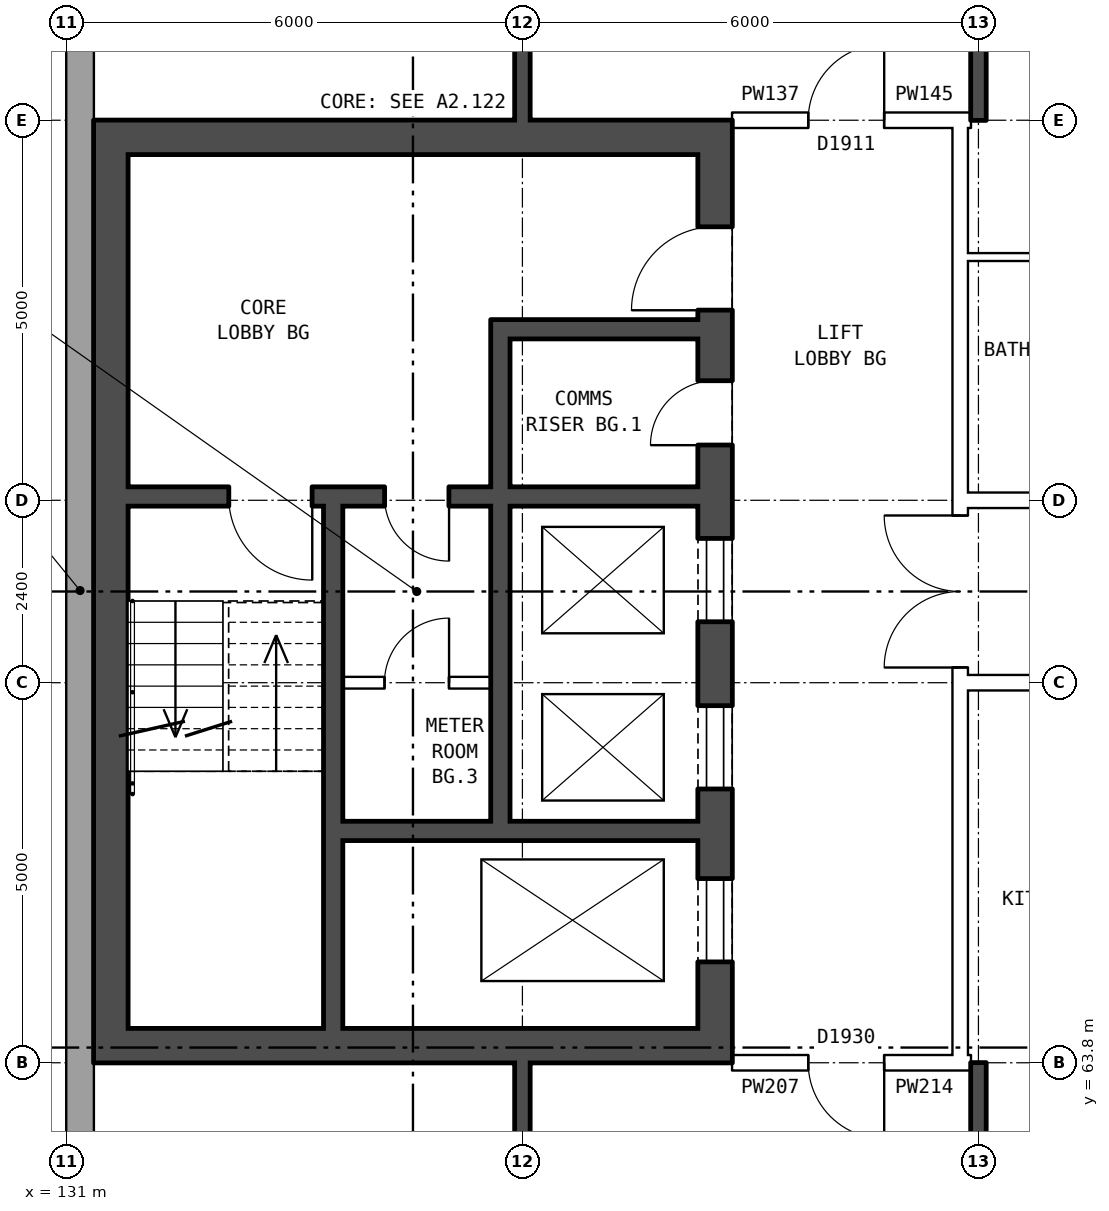
"""IFC4 building model, lengths in metres.
Left out: names, types, materials, properties, quantities, classifications, styles, units other than length and angle.
Written with IfcOpenShell. Run it as: python <this file> out.ifc"""

import sys

from ifc_helpers import new_model, si_unit, direction, frame, frame_2d, origin, place, context, subcontext, project, spatial, rectangle, extrude, element, fill, save


model = new_model("IFC4")
c1 = context("Model", 3, precision=1e-05, world=origin(), true_north=direction((0.0, 1.0)))
c2 = subcontext(c1, "Body", "Model", "MODEL_VIEW")
j1 = project(units=[si_unit("LENGTHUNIT", "METRE"), si_unit("PLANEANGLEUNIT", "RADIAN")], contexts=[c1])
p1 = place(None, origin())
s1 = spatial("IfcSite", under=j1, at=p1, CompositionType="ELEMENT")
p2 = place(p1, origin())
s2 = spatial("IfcBuilding", under=s1, at=p2, CompositionType="ELEMENT")
p3 = place(p2, frame((0.0, 0.0, 185.1)))
s3 = spatial("IfcBuildingStorey", under=s2, at=p3, CompositionType="ELEMENT", Elevation=185.1)
p4 = place(p3, frame((131.18, 82.925, 0.0), z_axis=(0.0, 0.0, 1.0), x_axis=(0.0, -1.0, 0.0)))
e1 = element("IfcWall", 1, at=p4, inside=s3, PredefinedType="STANDARD", context=c2, shape_type="SweptSolid", body=[
    extrude(rectangle(XDim=25.851, YDim=0.36, at=frame_2d((12.925, 0.0))), origin(), (0.0, 0.0, 1.0), 2.85),
])
p5 = place(p4, frame((1.625, 0.0, 0.8)))
e2 = element("IfcOpeningElement", 2, at=p5, cuts=e1, PredefinedType="OPENING", context=c2, shape_type="SweptSolid", body=[
    extrude(rectangle(XDim=1.6, YDim=1.8, at=frame_2d((0.8, 0.9))), frame((0.0, 0.19, 0.0), z_axis=(0.0, -1.0, 0.0), x_axis=(1.0, 0.0, 0.0)), (0.0, 0.0, 1.0), 0.38),
])
p6 = place(p4, frame((3.525, 0.0, 0.8)))
e3 = element("IfcOpeningElement", 3, at=p6, cuts=e1, PredefinedType="OPENING", context=c2, shape_type="SweptSolid", body=[
    extrude(rectangle(XDim=0.8, YDim=1.8, at=frame_2d((0.4, 0.9))), frame((0.0, 0.19, 0.0), z_axis=(0.0, -1.0, 0.0), x_axis=(1.0, 0.0, 0.0)), (0.0, 0.0, 1.0), 0.38),
])
p7 = place(p4, frame((20.2, 0.0, 0.8)))
e4 = element("IfcOpeningElement", 4, at=p7, cuts=e1, PredefinedType="OPENING", context=c2, shape_type="SweptSolid", body=[
    extrude(rectangle(XDim=0.6, YDim=0.9, at=frame_2d((0.3, 0.45))), frame((0.0, 0.19, 0.0), z_axis=(0.0, -1.0, 0.0), x_axis=(1.0, 0.0, 0.0)), (0.0, 0.0, 1.0), 0.38),
])
p8 = place(p4, frame((22.625, 0.0, 0.8)))
e5 = element("IfcOpeningElement", 5, at=p8, cuts=e1, PredefinedType="OPENING", context=c2, shape_type="SweptSolid", body=[
    extrude(rectangle(XDim=1.6, YDim=1.8, at=frame_2d((0.8, 0.9))), frame((0.0, 0.19, 0.0), z_axis=(0.0, -1.0, 0.0), x_axis=(1.0, 0.0, 0.0)), (0.0, 0.0, 1.0), 0.38),
])
p9 = place(p4, frame((4.625, 0.0, 0.8)))
e6 = element("IfcOpeningElement", 6, at=p9, cuts=e1, PredefinedType="OPENING", context=c2, shape_type="SweptSolid", body=[
    extrude(rectangle(XDim=1.0, YDim=0.9, at=frame_2d((0.5, 0.45))), frame((0.0, 0.19, 0.0), z_axis=(0.0, -1.0, 0.0), x_axis=(1.0, 0.0, 0.0)), (0.0, 0.0, 1.0), 0.38),
])
p10 = place(p4, frame((21.1, 0.0, 0.8)))
e7 = element("IfcOpeningElement", 7, at=p10, cuts=e1, PredefinedType="OPENING", context=c2, shape_type="SweptSolid", body=[
    extrude(rectangle(XDim=1.2, YDim=1.5, at=frame_2d((0.6, 0.75))), frame((0.0, 0.19, 0.0), z_axis=(0.0, -1.0, 0.0), x_axis=(1.0, 0.0, 0.0)), (0.0, 0.0, 1.0), 0.38),
])
p11 = place(p3, frame((139.535, 63.8, 0.0), z_axis=(0.0, 0.0, 1.0), x_axis=(0.0, 1.0, 0.0)))
e8 = element("IfcWall", 8, at=p11, inside=s3, PredefinedType="SHEAR", context=c2, shape_type="SweptSolid", body=[
    extrude(rectangle(XDim=12.4, YDim=0.45, at=frame_2d((6.2, 0.0))), origin(), (0.0, 0.0, 1.0), 2.85),
])
p12 = place(p11, frame((1.325, 0.0, 0.0)))
e9 = element("IfcOpeningElement", 9, at=p12, cuts=e8, PredefinedType="OPENING", context=c2, shape_type="SweptSolid", body=[
    extrude(rectangle(XDim=1.1, YDim=2.1, at=frame_2d((0.55, 1.05))), frame((0.0, 0.235, 0.0), z_axis=(0.0, -1.0, 0.0), x_axis=(1.0, 0.0, 0.0)), (0.0, 0.0, 1.0), 0.47),
])
p13 = place(p11, frame((3.6, 0.0, 0.0)))
e10 = element("IfcOpeningElement", 10, at=p13, cuts=e8, PredefinedType="OPENING", context=c2, shape_type="SweptSolid", body=[
    extrude(rectangle(XDim=1.1, YDim=2.1, at=frame_2d((0.55, 1.05))), frame((0.0, 0.235, 0.0), z_axis=(0.0, -1.0, 0.0), x_axis=(1.0, 0.0, 0.0)), (0.0, 0.0, 1.0), 0.47),
])
p14 = place(p11, frame((5.8, 0.0, 0.0)))
e11 = element("IfcOpeningElement", 11, at=p14, cuts=e8, PredefinedType="OPENING", context=c2, shape_type="SweptSolid", body=[
    extrude(rectangle(XDim=1.1, YDim=2.1, at=frame_2d((0.55, 1.05))), frame((0.0, 0.235, 0.0), z_axis=(0.0, -1.0, 0.0), x_axis=(1.0, 0.0, 0.0)), (0.0, 0.0, 1.0), 0.47),
])
p15 = place(p11, frame((9.9, 0.0, 0.0)))
e12 = element("IfcOpeningElement", 12, at=p15, cuts=e8, PredefinedType="OPENING", context=c2, shape_type="SweptSolid", body=[
    extrude(rectangle(XDim=1.1, YDim=2.1, at=frame_2d((0.55, 1.05))), frame((0.0, 0.235, 0.0), z_axis=(0.0, -1.0, 0.0), x_axis=(1.0, 0.0, 0.0)), (0.0, 0.0, 1.0), 0.47),
])
p16 = place(p11, frame((8.125, 0.0, 0.0)))
e13 = element("IfcOpeningElement", 13, at=p16, cuts=e8, PredefinedType="OPENING", context=c2, shape_type="SweptSolid", body=[
    extrude(rectangle(XDim=0.85, YDim=2.1, at=frame_2d((0.425, 1.05))), frame((0.0, 0.235, 0.0), z_axis=(0.0, -1.0, 0.0), x_axis=(1.0, 0.0, 0.0)), (0.0, 0.0, 1.0), 0.47),
])
p17 = place(p3, frame((131.585, 63.8, 0.0), z_axis=(0.0, 0.0, 1.0), x_axis=(0.0, 1.0, 0.0)))
e14 = element("IfcWall", 14, at=p17, inside=s3, PredefinedType="SHEAR", context=c2, shape_type="SweptSolid", body=[
    extrude(rectangle(XDim=12.4, YDim=0.45, at=frame_2d((6.2, 0.0))), origin(), (0.0, 0.0, 1.0), 2.85),
])
for number, where, z_axis, x_axis in (
    (15, (139.31, 64.025, 0.0), (0.0, 0.0, 1.0), (-1.0, 0.0, 0.0)),
    (16, (139.31, 75.975, 0.0), (0.0, 0.0, 1.0), (-1.0, 0.0, 0.0)),
):
    element("IfcWall", number, at=place(p3, frame(where, z_axis=z_axis, x_axis=x_axis)), inside=s3, PredefinedType="SHEAR", context=c2, shape_type="SweptSolid", body=[
        extrude(rectangle(XDim=7.5, YDim=0.45, at=frame_2d((3.75, 0.0))), origin(), (0.0, 0.0, 1.0), 2.85),
    ])
p18 = place(p3, frame((139.31, 66.85, 0.0), z_axis=(0.0, 0.0, 1.0), x_axis=(-1.0, 0.0, 0.0)))
e17 = element("IfcWall", 17, at=p18, inside=s3, PredefinedType="SHEAR", context=c2, shape_type="SweptSolid", body=[
    extrude(rectangle(XDim=4.675, YDim=0.25, at=frame_2d((2.337, 0.0))), origin(), (0.0, 0.0, 1.0), 2.85),
])
p19 = place(p3, frame((136.585, 68.8, 0.0), z_axis=(0.0, 0.0, 1.0), x_axis=(-1.0, 0.0, 0.0)))
e18 = element("IfcWall", 18, at=p19, inside=s3, PredefinedType="PARTITIONING", context=c2, shape_type="SweptSolid", body=[
    extrude(rectangle(XDim=1.95, YDim=0.15, at=frame_2d((0.975, 0.0))), origin(), (0.0, 0.0, 1.0), 2.85),
])
p20 = place(p19, frame((0.55, 0.0, 0.0)))
e19 = element("IfcOpeningElement", 19, at=p20, cuts=e18, PredefinedType="OPENING", context=c2, shape_type="SweptSolid", body=[
    extrude(rectangle(XDim=0.85, YDim=2.1, at=frame_2d((0.425, 1.05))), frame((0.0, 0.085, 0.0), z_axis=(0.0, -1.0, 0.0), x_axis=(1.0, 0.0, 0.0)), (0.0, 0.0, 1.0), 0.17),
])
p21 = place(p3, frame((139.31, 71.25, 0.0), z_axis=(0.0, 0.0, 1.0), x_axis=(-1.0, 0.0, 0.0)))
e20 = element("IfcWall", 20, at=p21, inside=s3, PredefinedType="SHEAR", context=c2, shape_type="SweptSolid", body=[
    extrude(rectangle(XDim=7.5, YDim=0.25, at=frame_2d((3.75, 0.0))), origin(), (0.0, 0.0, 1.0), 2.85),
])
p22 = place(p21, frame((5.075, 0.0, 0.0)))
e21 = element("IfcOpeningElement", 21, at=p22, cuts=e20, PredefinedType="OPENING", context=c2, shape_type="SweptSolid", body=[
    extrude(rectangle(XDim=1.1, YDim=2.1, at=frame_2d((0.55, 1.05))), frame((0.0, 0.135, 0.0), z_axis=(0.0, -1.0, 0.0), x_axis=(1.0, 0.0, 0.0)), (0.0, 0.0, 1.0), 0.27),
])
p23 = place(p21, frame((3.275, 0.0, 0.0)))
e22 = element("IfcOpeningElement", 22, at=p23, cuts=e20, PredefinedType="OPENING", context=c2, shape_type="SweptSolid", body=[
    extrude(rectangle(XDim=0.85, YDim=2.1, at=frame_2d((0.425, 1.05))), frame((0.0, 0.135, 0.0), z_axis=(0.0, -1.0, 0.0), x_axis=(1.0, 0.0, 0.0)), (0.0, 0.0, 1.0), 0.27),
])
p24 = place(p3, frame((139.31, 73.45, 0.0), z_axis=(0.0, 0.0, 1.0), x_axis=(-1.0, 0.0, 0.0)))
e23 = element("IfcWall", 23, at=p24, inside=s3, PredefinedType="SHEAR", context=c2, shape_type="SweptSolid", body=[
    extrude(rectangle(XDim=2.475, YDim=0.25, at=frame_2d((1.238, 0.0))), origin(), (0.0, 0.0, 1.0), 2.85),
])
p25 = place(p3, frame((136.71, 66.975, 0.0), z_axis=(0.0, 0.0, 1.0), x_axis=(0.0, 1.0, 0.0)))
e24 = element("IfcWall", 24, at=p25, inside=s3, PredefinedType="SHEAR", context=c2, shape_type="SweptSolid", body=[
    extrude(rectangle(XDim=4.15, YDim=0.25, at=frame_2d((2.075, 0.0))), origin(), (0.0, 0.0, 1.0), 2.85),
])
p26 = place(p3, frame((136.71, 71.375, 0.0), z_axis=(0.0, 0.0, 1.0), x_axis=(0.0, 1.0, 0.0)))
e25 = element("IfcWall", 25, at=p26, inside=s3, PredefinedType="SHEAR", context=c2, shape_type="SweptSolid", body=[
    extrude(rectangle(XDim=2.2, YDim=0.25, at=frame_2d((1.1, 0.0))), origin(), (0.0, 0.0, 1.0), 2.85),
])
p27 = place(p3, frame((134.51, 64.25, 0.0), z_axis=(0.0, 0.0, 1.0), x_axis=(0.0, 1.0, 0.0)))
e26 = element("IfcWall", 26, at=p27, inside=s3, PredefinedType="SHEAR", context=c2, shape_type="SweptSolid", body=[
    extrude(rectangle(XDim=6.875, YDim=0.25, at=frame_2d((3.438, 0.0))), origin(), (0.0, 0.0, 1.0), 2.85),
])
p28 = place(p3, frame((142.76, 63.9, 0.0), z_axis=(0.0, 0.0, 1.0), x_axis=(0.0, 1.0, 0.0)))
e27 = element("IfcWall", 27, at=p28, inside=s3, PredefinedType="PARTITIONING", context=c2, shape_type="SweptSolid", body=[
    extrude(rectangle(XDim=12.2, YDim=0.2, at=frame_2d((6.1, 0.0))), origin(), (0.0, 0.0, 1.0), 2.85),
])
p29 = place(p28, frame((5.1, 0.0, 0.0)))
e28 = element("IfcOpeningElement", 28, at=p29, cuts=e27, PredefinedType="OPENING", context=c2, shape_type="SweptSolid", body=[
    extrude(rectangle(XDim=2.0, YDim=2.1, at=frame_2d((1.0, 1.05))), frame((0.0, 0.11, 0.0), z_axis=(0.0, -1.0, 0.0), x_axis=(1.0, 0.0, 0.0)), (0.0, 0.0, 1.0), 0.22),
])
p30 = place(p3, frame((139.76, 63.8, 0.0), z_axis=(0.0, 0.0, 1.0), x_axis=(1.0, 0.0, 0.0)))
e29 = element("IfcWall", 29, at=p30, inside=s3, PredefinedType="PARTITIONING", context=c2, shape_type="SweptSolid", body=[
    extrude(rectangle(XDim=3.0, YDim=0.2, at=frame_2d((1.5, 0.0))), origin(), (0.0, 0.0, 1.0), 2.85),
])
p31 = place(p30, frame((1.0, 0.0, 0.0)))
e30 = element("IfcOpeningElement", 30, at=p31, cuts=e29, PredefinedType="OPENING", context=c2, shape_type="SweptSolid", body=[
    extrude(rectangle(XDim=1.0, YDim=2.1, at=frame_2d((0.5, 1.05))), frame((0.0, 0.11, 0.0), z_axis=(0.0, -1.0, 0.0), x_axis=(1.0, 0.0, 0.0)), (0.0, 0.0, 1.0), 0.22),
])
p32 = place(p3, frame((142.76, 63.8, 0.0), z_axis=(0.0, 0.0, 1.0), x_axis=(1.0, 0.0, 0.0)))
e31 = element("IfcWall", 31, at=p32, inside=s3, PredefinedType="PARTITIONING", context=c2, shape_type="SweptSolid", body=[
    extrude(rectangle(XDim=0.14, YDim=0.2, at=frame_2d((0.07, 0.0))), origin(), (0.0, 0.0, 1.0), 2.85),
])
p33 = place(p3, frame((142.76, 68.8, 0.0), z_axis=(0.0, 0.0, 1.0), x_axis=(1.0, 0.0, 0.0)))
e32 = element("IfcWall", 32, at=p33, inside=s3, PredefinedType="PARTITIONING", context=c2, shape_type="SweptSolid", body=[
    extrude(rectangle(XDim=14.48, YDim=0.2, at=frame_2d((7.24, 0.0))), origin(), (0.0, 0.0, 1.0), 2.85),
])
p34 = place(p33, frame((1.12, 0.0, 0.0)))
e33 = element("IfcOpeningElement", 33, at=p34, cuts=e32, PredefinedType="OPENING", context=c2, shape_type="SweptSolid", body=[
    extrude(rectangle(XDim=1.0, YDim=2.1, at=frame_2d((0.5, 1.05))), frame((0.0, 0.11, 0.0), z_axis=(0.0, -1.0, 0.0), x_axis=(1.0, 0.0, 0.0)), (0.0, 0.0, 1.0), 0.22),
])
p35 = place(p33, frame((7.24, 0.0, 0.0)))
e34 = element("IfcOpeningElement", 34, at=p35, cuts=e32, PredefinedType="OPENING", context=c2, shape_type="SweptSolid", body=[
    extrude(rectangle(XDim=1.0, YDim=2.1, at=frame_2d((0.5, 1.05))), frame((0.0, 0.11, 0.0), z_axis=(0.0, -1.0, 0.0), x_axis=(1.0, 0.0, 0.0)), (0.0, 0.0, 1.0), 0.22),
])
p36 = place(p3, frame((142.76, 71.2, 0.0), z_axis=(0.0, 0.0, 1.0), x_axis=(1.0, 0.0, 0.0)))
e35 = element("IfcWall", 35, at=p36, inside=s3, PredefinedType="PARTITIONING", context=c2, shape_type="SweptSolid", body=[
    extrude(rectangle(XDim=14.48, YDim=0.2, at=frame_2d((7.24, 0.0))), origin(), (0.0, 0.0, 1.0), 2.85),
])
p37 = place(p36, frame((4.24, 0.0, 0.0)))
e36 = element("IfcOpeningElement", 36, at=p37, cuts=e35, PredefinedType="OPENING", context=c2, shape_type="SweptSolid", body=[
    extrude(rectangle(XDim=1.0, YDim=2.1, at=frame_2d((0.5, 1.05))), frame((0.0, 0.11, 0.0), z_axis=(0.0, -1.0, 0.0), x_axis=(1.0, 0.0, 0.0)), (0.0, 0.0, 1.0), 0.22),
])
p38 = place(p36, frame((7.24, 0.0, 0.0)))
e37 = element("IfcOpeningElement", 37, at=p38, cuts=e35, PredefinedType="OPENING", context=c2, shape_type="SweptSolid", body=[
    extrude(rectangle(XDim=1.0, YDim=2.1, at=frame_2d((0.5, 1.05))), frame((0.0, 0.11, 0.0), z_axis=(0.0, -1.0, 0.0), x_axis=(1.0, 0.0, 0.0)), (0.0, 0.0, 1.0), 0.22),
])
p39 = place(p3, frame((142.76, 74.4, 0.0), z_axis=(0.0, 0.0, 1.0), x_axis=(1.0, 0.0, 0.0)))
e38 = element("IfcWall", 38, at=p39, inside=s3, PredefinedType="PARTITIONING", context=c2, shape_type="SweptSolid", body=[
    extrude(rectangle(XDim=3.24, YDim=0.1, at=frame_2d((1.62, 0.0))), origin(), (0.0, 0.0, 1.0), 2.85),
])
p40 = place(p3, frame((139.76, 76.2, 0.0), z_axis=(0.0, 0.0, 1.0), x_axis=(1.0, 0.0, 0.0)))
e39 = element("IfcWall", 39, at=p40, inside=s3, PredefinedType="PARTITIONING", context=c2, shape_type="SweptSolid", body=[
    extrude(rectangle(XDim=3.0, YDim=0.2, at=frame_2d((1.5, 0.0))), origin(), (0.0, 0.0, 1.0), 2.85),
])
p41 = place(p40, frame((1.0, 0.0, 0.0)))
e40 = element("IfcOpeningElement", 40, at=p41, cuts=e39, PredefinedType="OPENING", context=c2, shape_type="SweptSolid", body=[
    extrude(rectangle(XDim=1.0, YDim=2.1, at=frame_2d((0.5, 1.05))), frame((0.0, 0.11, 0.0), z_axis=(0.0, -1.0, 0.0), x_axis=(1.0, 0.0, 0.0)), (0.0, 0.0, 1.0), 0.22),
])
p42 = place(p3, frame((142.76, 76.2, 0.0), z_axis=(0.0, 0.0, 1.0), x_axis=(1.0, 0.0, 0.0)))
e41 = element("IfcWall", 41, at=p42, inside=s3, PredefinedType="PARTITIONING", context=c2, shape_type="SweptSolid", body=[
    extrude(rectangle(XDim=0.14, YDim=0.2, at=frame_2d((0.07, 0.0))), origin(), (0.0, 0.0, 1.0), 2.85),
])
p43 = place(p3, frame((137.0, 54.36, 0.0), z_axis=(0.0, 0.0, 1.0), x_axis=(0.0, 1.0, 0.0)))
e42 = element("IfcWall", 42, at=p43, inside=s3, PredefinedType="SOLIDWALL", context=c2, shape_type="SweptSolid", body=[
    extrude(rectangle(XDim=9.44, YDim=0.2, at=frame_2d((4.72, 0.0))), origin(), (0.0, 0.0, 1.0), 2.85),
])
p44 = place(p43, frame((7.04, 0.0, 0.0)))
e43 = element("IfcOpeningElement", 43, at=p44, cuts=e42, PredefinedType="OPENING", context=c2, shape_type="SweptSolid", body=[
    extrude(rectangle(XDim=0.9, YDim=2.1, at=frame_2d((0.45, 1.05))), frame((0.0, 0.11, 0.0), z_axis=(0.0, -1.0, 0.0), x_axis=(1.0, 0.0, 0.0)), (0.0, 0.0, 1.0), 0.22),
])
p45 = place(p3, frame((137.0, 76.2, 0.0), z_axis=(0.0, 0.0, 1.0), x_axis=(0.0, 1.0, 0.0)))
e44 = element("IfcWall", 44, at=p45, inside=s3, PredefinedType="SOLIDWALL", context=c2, shape_type="SweptSolid", body=[
    extrude(rectangle(XDim=9.44, YDim=0.2, at=frame_2d((4.72, 0.0))), origin(), (0.0, 0.0, 1.0), 2.85),
])
p46 = place(p45, frame((1.5, 0.0, 0.0)))
e45 = element("IfcOpeningElement", 45, at=p46, cuts=e44, PredefinedType="OPENING", context=c2, shape_type="SweptSolid", body=[
    extrude(rectangle(XDim=0.9, YDim=2.1, at=frame_2d((0.45, 1.05))), frame((0.0, 0.11, 0.0), z_axis=(0.0, -1.0, 0.0), x_axis=(1.0, 0.0, 0.0)), (0.0, 0.0, 1.0), 0.22),
])
for number, where, z_axis, x_axis in (
    (46, (143.0, 54.36, 0.0), (0.0, 0.0, 1.0), (0.0, 1.0, 0.0)),
    (47, (143.0, 76.2, 0.0), (0.0, 0.0, 1.0), (0.0, 1.0, 0.0)),
):
    element("IfcWall", number, at=place(p3, frame(where, z_axis=z_axis, x_axis=x_axis)), inside=s3, PredefinedType="SOLIDWALL", context=c2, shape_type="SweptSolid", body=[
        extrude(rectangle(XDim=9.44, YDim=0.2, at=frame_2d((4.72, 0.0))), origin(), (0.0, 0.0, 1.0), 2.85),
    ])
p47 = place(p12, origin())
e48 = element("IfcDoor", 48, at=p47, inside=s3, OperationType="DOUBLE_DOOR_SLIDING", PredefinedType="DOOR", context=c2, shape_type="SweptSolid", body=[
    extrude(rectangle(XDim=1.1, YDim=2.1, at=frame_2d((0.55, 1.05))), frame((0.0, 0.21, 0.0), z_axis=(0.0, -1.0, 0.0), x_axis=(1.0, 0.0, 0.0)), (0.0, 0.0, 1.0), 0.05),
])
fill(e9, e48)
p48 = place(p13, origin())
e49 = element("IfcDoor", 49, at=p48, inside=s3, OperationType="DOUBLE_DOOR_SLIDING", PredefinedType="DOOR", context=c2, shape_type="SweptSolid", body=[
    extrude(rectangle(XDim=1.1, YDim=2.1, at=frame_2d((0.55, 1.05))), frame((0.0, 0.21, 0.0), z_axis=(0.0, -1.0, 0.0), x_axis=(1.0, 0.0, 0.0)), (0.0, 0.0, 1.0), 0.05),
])
fill(e10, e49)
p49 = place(p14, origin())
e50 = element("IfcDoor", 50, at=p49, inside=s3, OperationType="DOUBLE_DOOR_SLIDING", PredefinedType="DOOR", context=c2, shape_type="SweptSolid", body=[
    extrude(rectangle(XDim=1.1, YDim=2.1, at=frame_2d((0.55, 1.05))), frame((0.0, 0.21, 0.0), z_axis=(0.0, -1.0, 0.0), x_axis=(1.0, 0.0, 0.0)), (0.0, 0.0, 1.0), 0.05),
])
fill(e11, e50)
p50 = place(p15, origin())
e51 = element("IfcDoor", 51, at=p50, inside=s3, OperationType="SINGLE_SWING_LEFT", PredefinedType="DOOR", context=c2, shape_type="SweptSolid", body=[
    extrude(rectangle(XDim=1.1, YDim=2.1, at=frame_2d((0.55, 1.05))), frame((0.0, 0.21, 0.0), z_axis=(0.0, -1.0, 0.0), x_axis=(1.0, 0.0, 0.0)), (0.0, 0.0, 1.0), 0.05),
])
fill(e12, e51)
p51 = place(p22, origin())
e52 = element("IfcDoor", 52, at=p51, inside=s3, OperationType="SINGLE_SWING_LEFT", PredefinedType="DOOR", context=c2, shape_type="SweptSolid", body=[
    extrude(rectangle(XDim=1.1, YDim=2.1, at=frame_2d((0.55, 1.05))), frame((0.0, 0.025, 0.0), z_axis=(0.0, -1.0, 0.0), x_axis=(1.0, 0.0, 0.0)), (0.0, 0.0, 1.0), 0.05),
])
fill(e21, e52)
p52 = place(p16, origin())
e53 = element("IfcDoor", 53, at=p52, inside=s3, OperationType="SINGLE_SWING_LEFT", PredefinedType="DOOR", context=c2, shape_type="SweptSolid", body=[
    extrude(rectangle(XDim=0.85, YDim=2.1, at=frame_2d((0.425, 1.05))), frame((0.0, 0.21, 0.0), z_axis=(0.0, -1.0, 0.0), x_axis=(1.0, 0.0, 0.0)), (0.0, 0.0, 1.0), 0.05),
])
fill(e13, e53)
p53 = place(p23, origin())
e54 = element("IfcDoor", 54, at=p53, inside=s3, OperationType="SINGLE_SWING_LEFT", PredefinedType="DOOR", context=c2, shape_type="SweptSolid", body=[
    extrude(rectangle(XDim=0.85, YDim=2.1, at=frame_2d((0.425, 1.05))), frame((0.0, 0.025, 0.0), z_axis=(0.0, -1.0, 0.0), x_axis=(1.0, 0.0, 0.0)), (0.0, 0.0, 1.0), 0.05),
])
fill(e22, e54)
p54 = place(p20, frame((0.85, 0.0, 0.0), z_axis=(0.0, 0.0, 1.0), x_axis=(-1.0, 0.0, 0.0)))
e55 = element("IfcDoor", 55, at=p54, inside=s3, OperationType="SINGLE_SWING_RIGHT", PredefinedType="DOOR", context=c2, shape_type="SweptSolid", body=[
    extrude(rectangle(XDim=0.85, YDim=2.1, at=frame_2d((0.425, 1.05))), frame((0.0, 0.025, 0.0), z_axis=(0.0, -1.0, 0.0), x_axis=(1.0, 0.0, 0.0)), (0.0, 0.0, 1.0), 0.05),
])
fill(e19, e55)
p55 = place(p29, origin())
e56 = element("IfcDoor", 56, at=p55, inside=s3, OperationType="DOUBLE_DOOR_SINGLE_SWING", PredefinedType="DOOR", context=c2, shape_type="SweptSolid", body=[
    extrude(rectangle(XDim=2.0, YDim=2.1, at=frame_2d((1.0, 1.05))), frame((0.0, 0.025, 0.0), z_axis=(0.0, -1.0, 0.0), x_axis=(1.0, 0.0, 0.0)), (0.0, 0.0, 1.0), 0.05),
])
fill(e28, e56)
p56 = place(p31, frame((1.0, 0.0, 0.0), z_axis=(0.0, 0.0, 1.0), x_axis=(-1.0, 0.0, 0.0)))
e57 = element("IfcDoor", 57, at=p56, inside=s3, OperationType="SINGLE_SWING_LEFT", PredefinedType="DOOR", context=c2, shape_type="SweptSolid", body=[
    extrude(rectangle(XDim=1.0, YDim=2.1, at=frame_2d((0.5, 1.05))), frame((0.0, 0.025, 0.0), z_axis=(0.0, -1.0, 0.0), x_axis=(1.0, 0.0, 0.0)), (0.0, 0.0, 1.0), 0.05),
])
fill(e30, e57)
p57 = place(p41, origin())
e58 = element("IfcDoor", 58, at=p57, inside=s3, OperationType="SINGLE_SWING_RIGHT", PredefinedType="DOOR", context=c2, shape_type="SweptSolid", body=[
    extrude(rectangle(XDim=1.0, YDim=2.1, at=frame_2d((0.5, 1.05))), frame((0.0, 0.025, 0.0), z_axis=(0.0, -1.0, 0.0), x_axis=(1.0, 0.0, 0.0)), (0.0, 0.0, 1.0), 0.05),
])
fill(e40, e58)
save(model, sys.argv[1])
